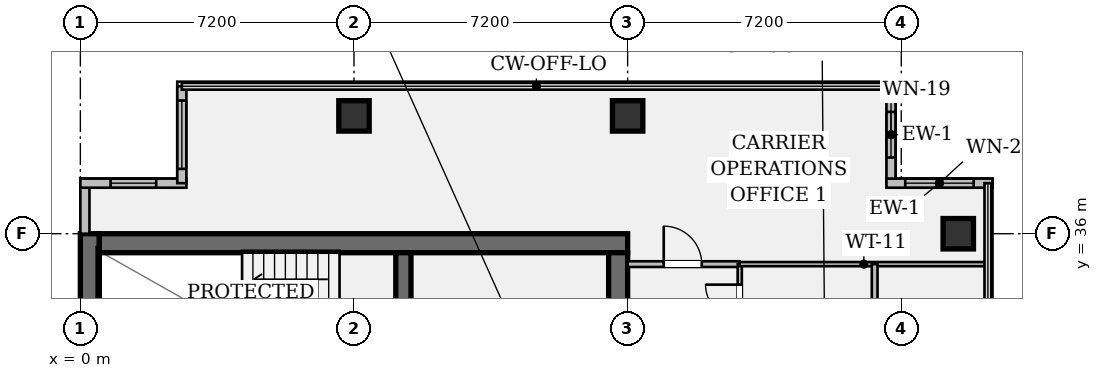
"""IFC4 building model, lengths in metres.
Left out: names, types, materials, properties, quantities, classifications, styles, units other than length and angle.
Written with IfcOpenShell. Run it as: python <this file> out.ifc"""

import sys

from ifc_helpers import new_model, si_unit, direction, frame, frame_2d, origin, origin_2d, place, context, subcontext, project, spatial, rectangle, hollow_rectangle, extrude, element, fill, save


model = new_model("IFC4")
c1 = context("Model", 3, precision=1e-05, world=origin(), true_north=direction((0.0, 1.0)))
c2 = subcontext(c1, "Body", "Model", "MODEL_VIEW")
j1 = project(units=[si_unit("LENGTHUNIT", "METRE"), si_unit("PLANEANGLEUNIT", "RADIAN")], contexts=[c1])
p1 = place(None, origin())
s1 = spatial("IfcSite", under=j1, at=p1, CompositionType="ELEMENT")
p2 = place(p1, origin())
s2 = spatial("IfcBuilding", under=s1, at=p2, CompositionType="ELEMENT")
p3 = place(p2, frame((0.0, 0.0, 190.75)))
s3 = spatial("IfcBuildingStorey", under=s2, at=p3, CompositionType="ELEMENT", Elevation=190.75)
p4 = place(p3, frame((0.25, 7.2, 0.0), z_axis=(0.0, 0.0, 1.0), x_axis=(0.0, 1.0, 0.0)))
e1 = element("IfcWall", 1, at=p4, inside=s3, PredefinedType="SHEAR", context=c2, shape_type="SweptSolid", body=[
    extrude(rectangle(XDim=28.8, YDim=0.5, at=frame_2d((14.4, 0.0))), origin(), (0.0, 0.0, 1.0), 3.24),
])
p5 = place(p3, frame((0.5, 35.75, 0.0), z_axis=(0.0, 0.0, 1.0), x_axis=(1.0, 0.0, 0.0)))
e2 = element("IfcWall", 2, at=p5, inside=s3, PredefinedType="SHEAR", context=c2, shape_type="SweptSolid", body=[
    extrude(rectangle(XDim=13.9, YDim=0.5, at=frame_2d((6.95, 0.0))), origin(), (0.0, 0.0, 1.0), 3.24),
])
p6 = place(p3, frame((14.15, 35.5, 0.0), z_axis=(0.0, 0.0, 1.0), x_axis=(0.0, -1.0, 0.0)))
e3 = element("IfcWall", 3, at=p6, inside=s3, PredefinedType="SHEAR", context=c2, shape_type="SweptSolid", body=[
    extrude(rectangle(XDim=27.8, YDim=0.5, at=frame_2d((13.9, 0.0))), origin(), (0.0, 0.0, 1.0), 3.24),
])
p7 = place(p6, frame((1.4, 0.0, 0.0)))
e4 = element("IfcOpeningElement", 4, at=p7, cuts=e3, PredefinedType="OPENING", context=c2, shape_type="SweptSolid", body=[
    extrude(rectangle(XDim=1.2, YDim=2.15, at=frame_2d((0.6, 1.075))), frame((0.0, 0.262, 0.0), z_axis=(0.0, -1.0, 0.0), x_axis=(1.0, 0.0, 0.0)), (0.0, 0.0, 1.0), 0.524),
])
p8 = place(p6, frame((25.35, 0.0, 0.0)))
e5 = element("IfcOpeningElement", 5, at=p8, cuts=e3, PredefinedType="OPENING", context=c2, shape_type="SweptSolid", body=[
    extrude(rectangle(XDim=1.2, YDim=2.15, at=frame_2d((0.6, 1.075))), frame((0.0, 0.262, 0.0), z_axis=(0.0, -1.0, 0.0), x_axis=(1.0, 0.0, 0.0)), (0.0, 0.0, 1.0), 0.524),
])
p9 = place(p6, frame((14.7, 0.0, 0.0)))
e6 = element("IfcOpeningElement", 6, at=p9, cuts=e3, PredefinedType="OPENING", context=c2, shape_type="SweptSolid", body=[
    extrude(rectangle(XDim=1.6, YDim=2.2, at=frame_2d((0.8, 1.1))), frame((0.0, 0.262, 0.0), z_axis=(0.0, -1.0, 0.0), x_axis=(1.0, 0.0, 0.0)), (0.0, 0.0, 1.0), 0.524),
])
p10 = place(p3, frame((8.5, 31.72, 0.0), z_axis=(0.0, 0.0, 1.0), x_axis=(0.0, 1.0, 0.0)))
e7 = element("IfcWall", 7, at=p10, inside=s3, PredefinedType="SHEAR", context=c2, shape_type="SweptSolid", body=[
    extrude(rectangle(XDim=3.78, YDim=0.4, at=frame_2d((1.89, 0.0))), origin(), (0.0, 0.0, 1.0), 3.24),
])
p11 = place(p10, frame((0.9, 0.0, 0.0)))
e8 = element("IfcOpeningElement", 8, at=p11, cuts=e7, PredefinedType="OPENING", context=c2, shape_type="SweptSolid", body=[
    extrude(rectangle(XDim=1.1, YDim=2.15, at=frame_2d((0.55, 1.075))), frame((0.0, 0.212, 0.0), z_axis=(0.0, -1.0, 0.0), x_axis=(1.0, 0.0, 0.0)), (0.0, 0.0, 1.0), 0.424),
])
for number, where, z_axis, x_axis in (
    (9, (7.2, 39.1, 0.0), (0.0, 0.0, 1.0), (1.0, 0.0, 0.0)),
    (10, (14.4, 39.1, 0.0), (0.0, 0.0, 1.0), (1.0, 0.0, 0.0)),
    (11, (23.1, 36.0, 0.0), (0.0, 0.0, 1.0), (1.0, 0.0, 0.0)),
):
    element("IfcColumn", number, at=place(p3, frame(where, z_axis=z_axis, x_axis=x_axis)), inside=s3, PredefinedType="COLUMN", context=c2, shape_type="SweptSolid", body=[
        extrude(hollow_rectangle(XDim=0.8, YDim=0.8, WallThickness=0.05, at=origin_2d()), origin(), (0.0, 0.0, 1.0), 3.24),
    ])
p12 = place(p3, frame((0.12, 36.0, 0.0), z_axis=(0.0, 0.0, 1.0), x_axis=(0.0, 1.0, 0.0)))
e12 = element("IfcWall", 12, at=p12, inside=s3, PredefinedType="STANDARD", context=c2, shape_type="SweptSolid", body=[
    extrude(rectangle(XDim=1.33, YDim=0.24, at=frame_2d((0.665, 0.0))), origin(), (0.0, 0.0, 1.0), 3.24),
])
p13 = place(p3, frame((0.0, 37.33, 0.0), z_axis=(0.0, 0.0, 1.0), x_axis=(1.0, 0.0, 0.0)))
e13 = element("IfcWall", 13, at=p13, inside=s3, PredefinedType="STANDARD", context=c2, shape_type="SweptSolid", body=[
    extrude(rectangle(XDim=2.79, YDim=0.24, at=frame_2d((1.395, 0.0))), origin(), (0.0, 0.0, 1.0), 3.24),
])
p14 = place(p13, frame((0.795, 0.0, 0.95)))
e14 = element("IfcOpeningElement", 14, at=p14, cuts=e13, PredefinedType="OPENING", context=c2, shape_type="SweptSolid", body=[
    extrude(rectangle(XDim=1.2, YDim=1.8, at=frame_2d((0.6, 0.9))), frame((0.0, 0.132, 0.0), z_axis=(0.0, -1.0, 0.0), x_axis=(1.0, 0.0, 0.0)), (0.0, 0.0, 1.0), 0.264),
])
p15 = place(p3, frame((2.67, 37.33, 0.0), z_axis=(0.0, 0.0, 1.0), x_axis=(0.0, 1.0, 0.0)))
e15 = element("IfcWall", 15, at=p15, inside=s3, PredefinedType="STANDARD", context=c2, shape_type="SweptSolid", body=[
    extrude(rectangle(XDim=2.55, YDim=0.24, at=frame_2d((1.275, 0.0))), origin(), (0.0, 0.0, 1.0), 3.24),
])
p16 = place(p15, frame((0.375, 0.0, 0.95)))
e16 = element("IfcOpeningElement", 16, at=p16, cuts=e15, PredefinedType="OPENING", context=c2, shape_type="SweptSolid", body=[
    extrude(rectangle(XDim=1.8, YDim=1.35, at=frame_2d((0.9, 0.675))), frame((0.0, 0.132, 0.0), z_axis=(0.0, -1.0, 0.0), x_axis=(1.0, 0.0, 0.0)), (0.0, 0.0, 1.0), 0.264),
])
p17 = place(p3, frame((21.33, 39.88, 0.0), z_axis=(0.0, 0.0, 1.0), x_axis=(0.0, -1.0, 0.0)))
e17 = element("IfcWall", 17, at=p17, inside=s3, PredefinedType="STANDARD", context=c2, shape_type="SweptSolid", body=[
    extrude(rectangle(XDim=2.55, YDim=0.24, at=frame_2d((1.275, 0.0))), origin(), (0.0, 0.0, 1.0), 3.24),
])
p18 = place(p17, frame((0.675, 0.0, 0.95)))
e18 = element("IfcOpeningElement", 18, at=p18, cuts=e17, PredefinedType="OPENING", context=c2, shape_type="SweptSolid", body=[
    extrude(rectangle(XDim=1.2, YDim=1.8, at=frame_2d((0.6, 0.9))), frame((0.0, 0.132, 0.0), z_axis=(0.0, -1.0, 0.0), x_axis=(1.0, 0.0, 0.0)), (0.0, 0.0, 1.0), 0.264),
])
p19 = place(p3, frame((21.21, 37.33, 0.0), z_axis=(0.0, 0.0, 1.0), x_axis=(1.0, 0.0, 0.0)))
e19 = element("IfcWall", 19, at=p19, inside=s3, PredefinedType="STANDARD", context=c2, shape_type="SweptSolid", body=[
    extrude(rectangle(XDim=2.79, YDim=0.24, at=frame_2d((1.395, 0.0))), origin(), (0.0, 0.0, 1.0), 3.24),
])
p20 = place(p19, frame((0.495, 0.0, 0.95)))
e20 = element("IfcOpeningElement", 20, at=p20, cuts=e19, PredefinedType="OPENING", context=c2, shape_type="SweptSolid", body=[
    extrude(rectangle(XDim=1.8, YDim=1.35, at=frame_2d((0.9, 0.675))), frame((0.0, 0.132, 0.0), z_axis=(0.0, -1.0, 0.0), x_axis=(1.0, 0.0, 0.0)), (0.0, 0.0, 1.0), 0.264),
])
p21 = place(p3, frame((14.4, 35.2, 0.0), z_axis=(0.0, 0.0, 1.0), x_axis=(1.0, 0.0, 0.0)))
e21 = element("IfcWall", 21, at=p21, inside=s3, PredefinedType="PARTITIONING", context=c2, shape_type="SweptSolid", body=[
    extrude(rectangle(XDim=2.95, YDim=0.15, at=frame_2d((1.475, 0.0))), origin(), (0.0, 0.0, 1.0), 2.808),
])
p22 = place(p21, frame((0.95, 0.0, 0.0)))
e22 = element("IfcOpeningElement", 22, at=p22, cuts=e21, PredefinedType="OPENING", context=c2, shape_type="SweptSolid", body=[
    extrude(rectangle(XDim=1.0, YDim=2.15, at=frame_2d((0.5, 1.075))), frame((0.0, 0.087, 0.0), z_axis=(0.0, -1.0, 0.0), x_axis=(1.0, 0.0, 0.0)), (0.0, 0.0, 1.0), 0.174),
])
p23 = place(p3, frame((17.35, 20.35, 0.0), z_axis=(0.0, 0.0, 1.0), x_axis=(0.0, 1.0, 0.0)))
e23 = element("IfcWall", 23, at=p23, inside=s3, PredefinedType="PARTITIONING", context=c2, shape_type="SweptSolid", body=[
    extrude(rectangle(XDim=14.85, YDim=0.11, at=frame_2d((7.425, 0.0))), origin(), (0.0, 0.0, 1.0), 2.603),
])
p24 = place(p23, frame((3.84, 0.0, 0.0)))
e24 = element("IfcOpeningElement", 24, at=p24, cuts=e23, PredefinedType="OPENING", context=c2, shape_type="SweptSolid", body=[
    extrude(rectangle(XDim=0.9, YDim=2.15, at=frame_2d((0.45, 1.075))), frame((0.0, 0.067, 0.0), z_axis=(0.0, -1.0, 0.0), x_axis=(1.0, 0.0, 0.0)), (0.0, 0.0, 1.0), 0.134),
])
p25 = place(p23, frame((7.04, 0.0, 0.0)))
e25 = element("IfcOpeningElement", 25, at=p25, cuts=e23, PredefinedType="OPENING", context=c2, shape_type="SweptSolid", body=[
    extrude(rectangle(XDim=0.9, YDim=2.15, at=frame_2d((0.45, 1.075))), frame((0.0, 0.067, 0.0), z_axis=(0.0, -1.0, 0.0), x_axis=(1.0, 0.0, 0.0)), (0.0, 0.0, 1.0), 0.134),
])
p26 = place(p23, frame((10.22, 0.0, 0.0)))
e26 = element("IfcOpeningElement", 26, at=p26, cuts=e23, PredefinedType="OPENING", context=c2, shape_type="SweptSolid", body=[
    extrude(rectangle(XDim=0.9, YDim=2.15, at=frame_2d((0.45, 1.075))), frame((0.0, 0.067, 0.0), z_axis=(0.0, -1.0, 0.0), x_axis=(1.0, 0.0, 0.0)), (0.0, 0.0, 1.0), 0.134),
])
p27 = place(p23, frame((13.41, 0.0, 0.0)))
e27 = element("IfcOpeningElement", 27, at=p27, cuts=e23, PredefinedType="OPENING", context=c2, shape_type="SweptSolid", body=[
    extrude(rectangle(XDim=0.9, YDim=2.15, at=frame_2d((0.45, 1.075))), frame((0.0, 0.067, 0.0), z_axis=(0.0, -1.0, 0.0), x_axis=(1.0, 0.0, 0.0)), (0.0, 0.0, 1.0), 0.134),
])
p28 = place(p3, frame((17.35, 35.2, 0.0), z_axis=(0.0, 0.0, 1.0), x_axis=(1.0, 0.0, 0.0)))
e28 = element("IfcWall", 28, at=p28, inside=s3, PredefinedType="PARTITIONING", context=c2, shape_type="SweptSolid", body=[
    extrude(rectangle(XDim=6.53, YDim=0.11, at=frame_2d((3.265, 0.0))), origin(), (0.0, 0.0, 1.0), 2.758),
])
p29 = place(p3, frame((20.9, 22.95, 0.0), z_axis=(0.0, 0.0, 1.0), x_axis=(0.0, 1.0, 0.0)))
e29 = element("IfcWall", 29, at=p29, inside=s3, PredefinedType="PARTITIONING", context=c2, shape_type="SweptSolid", body=[
    extrude(rectangle(XDim=12.25, YDim=0.15, at=frame_2d((6.125, 0.0))), origin(), (0.0, 0.0, 1.0), 2.603),
])
p30 = place(p14, origin())
e30 = element("IfcWindow", 30, at=p30, inside=s3, PartitioningType="SINGLE_PANEL", PredefinedType="WINDOW", context=c2, shape_type="SweptSolid", body=[
    extrude(rectangle(XDim=1.2, YDim=1.8, at=frame_2d((0.6, 0.9))), frame((0.0, 0.03, 0.0), z_axis=(0.0, -1.0, 0.0), x_axis=(1.0, 0.0, 0.0)), (0.0, 0.0, 1.0), 0.06),
])
fill(e14, e30)
p31 = place(p16, origin())
e31 = element("IfcWindow", 31, at=p31, inside=s3, PartitioningType="SINGLE_PANEL", PredefinedType="WINDOW", context=c2, shape_type="SweptSolid", body=[
    extrude(rectangle(XDim=1.8, YDim=1.35, at=frame_2d((0.9, 0.675))), frame((0.0, 0.03, 0.0), z_axis=(0.0, -1.0, 0.0), x_axis=(1.0, 0.0, 0.0)), (0.0, 0.0, 1.0), 0.06),
])
fill(e16, e31)
p32 = place(p18, origin())
e32 = element("IfcWindow", 32, at=p32, inside=s3, PartitioningType="SINGLE_PANEL", PredefinedType="WINDOW", context=c2, shape_type="SweptSolid", body=[
    extrude(rectangle(XDim=1.2, YDim=1.8, at=frame_2d((0.6, 0.9))), frame((0.0, 0.03, 0.0), z_axis=(0.0, -1.0, 0.0), x_axis=(1.0, 0.0, 0.0)), (0.0, 0.0, 1.0), 0.06),
])
fill(e18, e32)
p33 = place(p20, origin())
e33 = element("IfcWindow", 33, at=p33, inside=s3, PartitioningType="SINGLE_PANEL", PredefinedType="WINDOW", context=c2, shape_type="SweptSolid", body=[
    extrude(rectangle(XDim=1.8, YDim=1.35, at=frame_2d((0.9, 0.675))), frame((0.0, 0.03, 0.0), z_axis=(0.0, -1.0, 0.0), x_axis=(1.0, 0.0, 0.0)), (0.0, 0.0, 1.0), 0.06),
])
fill(e20, e33)
p34 = place(p22, origin())
e34 = element("IfcDoor", 34, at=p34, inside=s3, OperationType="SINGLE_SWING_LEFT", PredefinedType="DOOR", context=c2, shape_type="SweptSolid", body=[
    extrude(rectangle(XDim=1.0, YDim=2.15, at=frame_2d((0.5, 1.075))), frame((0.0, 0.025, 0.0), z_axis=(0.0, -1.0, 0.0), x_axis=(1.0, 0.0, 0.0)), (0.0, 0.0, 1.0), 0.05),
])
fill(e22, e34)
p35 = place(p27, origin())
e35 = element("IfcDoor", 35, at=p35, inside=s3, OperationType="SINGLE_SWING_RIGHT", PredefinedType="DOOR", context=c2, shape_type="SweptSolid", body=[
    extrude(rectangle(XDim=0.9, YDim=2.15, at=frame_2d((0.45, 1.075))), frame((0.0, 0.025, 0.0), z_axis=(0.0, -1.0, 0.0), x_axis=(1.0, 0.0, 0.0)), (0.0, 0.0, 1.0), 0.05),
])
fill(e27, e35)
save(model, sys.argv[1])
